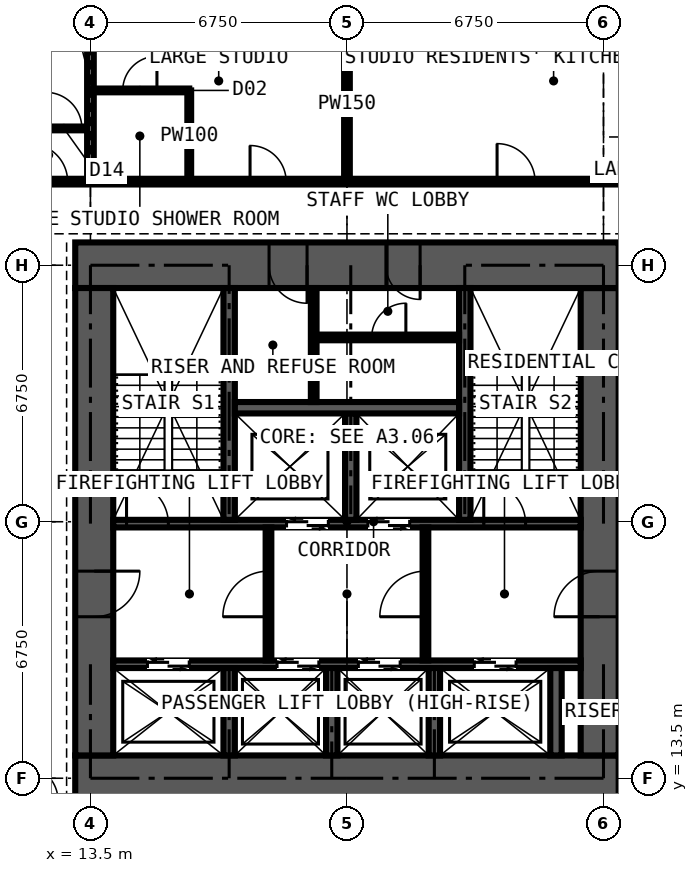
"""IFC4 building model, lengths in metres.
Left out: names, types, materials, properties, quantities, classifications, styles, units other than length and angle.
Written with IfcOpenShell. Run it as: python <this file> out.ifc"""

import sys

from ifc_helpers import new_model, si_unit, direction, frame, frame_2d, origin, place, context, subcontext, project, spatial, rectangle, extrude, element, fill, save


model = new_model("IFC4")
c1 = context("Model", 3, precision=1e-05, world=origin(), true_north=direction((0.0, 1.0)))
c2 = subcontext(c1, "Body", "Model", "MODEL_VIEW")
j1 = project(units=[si_unit("LENGTHUNIT", "METRE"), si_unit("PLANEANGLEUNIT", "RADIAN")], contexts=[c1])
p1 = place(None, origin())
s1 = spatial("IfcSite", under=j1, at=p1, CompositionType="ELEMENT")
p2 = place(p1, origin())
s2 = spatial("IfcBuilding", under=s1, at=p2, CompositionType="ELEMENT")
p3 = place(p2, frame((0.0, 0.0, 149.4)))
s3 = spatial("IfcBuildingStorey", under=s2, at=p3, CompositionType="ELEMENT", Elevation=149.4)
p4 = place(p3, frame((13.1, 13.5, 0.0), z_axis=(0.0, 0.0, 1.0), x_axis=(1.0, 0.0, 0.0)))
e1 = element("IfcWall", 1, at=p4, inside=s3, PredefinedType="SHEAR", context=c2, shape_type="SweptSolid", body=[
    extrude(rectangle(XDim=14.3, YDim=1.2, at=frame_2d((7.15, 0.0))), origin(), (0.0, 0.0, 1.0), 3.6),
])
p5 = place(p3, frame((26.9, 14.1, 0.0), z_axis=(0.0, 0.0, 1.0), x_axis=(0.0, 1.0, 0.0)))
e2 = element("IfcWall", 2, at=p5, inside=s3, PredefinedType="SHEAR", context=c2, shape_type="SweptSolid", body=[
    extrude(rectangle(XDim=12.3, YDim=1.0, at=frame_2d((6.15, 0.0))), origin(), (0.0, 0.0, 1.0), 3.6),
])
p6 = place(p5, frame((3.65, 0.0, 0.0)))
e3 = element("IfcOpeningElement", 3, at=p6, cuts=e2, PredefinedType="OPENING", context=c2, shape_type="SweptSolid", body=[
    extrude(rectangle(XDim=1.2, YDim=2.2, at=frame_2d((0.6, 1.1))), frame((0.0, 0.51, 0.0), z_axis=(0.0, -1.0, 0.0), x_axis=(1.0, 0.0, 0.0)), (0.0, 0.0, 1.0), 1.02),
])
p7 = place(p3, frame((27.4, 27.0, 0.0), z_axis=(0.0, 0.0, 1.0), x_axis=(-1.0, 0.0, 0.0)))
e4 = element("IfcWall", 4, at=p7, inside=s3, PredefinedType="SHEAR", context=c2, shape_type="SweptSolid", body=[
    extrude(rectangle(XDim=14.3, YDim=1.2, at=frame_2d((7.15, 0.0))), origin(), (0.0, 0.0, 1.0), 3.6),
])
p8 = place(p7, frame((5.225, 0.0, 0.0)))
e5 = element("IfcOpeningElement", 5, at=p8, cuts=e4, PredefinedType="OPENING", context=c2, shape_type="SweptSolid", body=[
    extrude(rectangle(XDim=0.9, YDim=2.2, at=frame_2d((0.45, 1.1))), frame((0.0, 0.61, 0.0), z_axis=(0.0, -1.0, 0.0), x_axis=(1.0, 0.0, 0.0)), (0.0, 0.0, 1.0), 1.22),
])
p9 = place(p7, frame((8.2, 0.0, 0.0)))
e6 = element("IfcOpeningElement", 6, at=p9, cuts=e4, PredefinedType="OPENING", context=c2, shape_type="SweptSolid", body=[
    extrude(rectangle(XDim=1.0, YDim=2.2, at=frame_2d((0.5, 1.1))), frame((0.0, 0.61, 0.0), z_axis=(0.0, -1.0, 0.0), x_axis=(1.0, 0.0, 0.0)), (0.0, 0.0, 1.0), 1.22),
])
p10 = place(p3, frame((13.6, 26.4, 0.0), z_axis=(0.0, 0.0, 1.0), x_axis=(0.0, -1.0, 0.0)))
e7 = element("IfcWall", 7, at=p10, inside=s3, PredefinedType="SHEAR", context=c2, shape_type="SweptSolid", body=[
    extrude(rectangle(XDim=12.3, YDim=1.0, at=frame_2d((6.15, 0.0))), origin(), (0.0, 0.0, 1.0), 3.6),
])
p11 = place(p10, frame((7.45, 0.0, 0.0)))
e8 = element("IfcOpeningElement", 8, at=p11, cuts=e7, PredefinedType="OPENING", context=c2, shape_type="SweptSolid", body=[
    extrude(rectangle(XDim=1.2, YDim=2.2, at=frame_2d((0.6, 1.1))), frame((0.0, 0.51, 0.0), z_axis=(0.0, -1.0, 0.0), x_axis=(1.0, 0.0, 0.0)), (0.0, 0.0, 1.0), 1.02),
])
p12 = place(p3, frame((14.1, 16.5, 0.0), z_axis=(0.0, 0.0, 1.0), x_axis=(1.0, 0.0, 0.0)))
e9 = element("IfcWall", 9, at=p12, inside=s3, PredefinedType="SHEAR", context=c2, shape_type="SweptSolid", body=[
    extrude(rectangle(XDim=12.3, YDim=0.2, at=frame_2d((6.15, 0.0))), origin(), (0.0, 0.0, 1.0), 3.6),
])
p13 = place(p12, frame((0.9, 0.0, 0.0)))
e10 = element("IfcOpeningElement", 10, at=p13, cuts=e9, PredefinedType="OPENING", context=c2, shape_type="SweptSolid", body=[
    extrude(rectangle(XDim=1.1, YDim=2.2, at=frame_2d((0.55, 1.1))), frame((0.0, 0.11, 0.0), z_axis=(0.0, -1.0, 0.0), x_axis=(1.0, 0.0, 0.0)), (0.0, 0.0, 1.0), 0.22),
])
p14 = place(p12, frame((4.31, 0.0, 0.0)))
e11 = element("IfcOpeningElement", 11, at=p14, cuts=e9, PredefinedType="OPENING", context=c2, shape_type="SweptSolid", body=[
    extrude(rectangle(XDim=1.1, YDim=2.2, at=frame_2d((0.55, 1.1))), frame((0.0, 0.11, 0.0), z_axis=(0.0, -1.0, 0.0), x_axis=(1.0, 0.0, 0.0)), (0.0, 0.0, 1.0), 0.22),
])
p15 = place(p12, frame((6.45, 0.0, 0.0)))
e12 = element("IfcOpeningElement", 12, at=p15, cuts=e9, PredefinedType="OPENING", context=c2, shape_type="SweptSolid", body=[
    extrude(rectangle(XDim=1.1, YDim=2.2, at=frame_2d((0.55, 1.1))), frame((0.0, 0.11, 0.0), z_axis=(0.0, -1.0, 0.0), x_axis=(1.0, 0.0, 0.0)), (0.0, 0.0, 1.0), 0.22),
])
p16 = place(p12, frame((9.5, 0.0, 0.0)))
e13 = element("IfcOpeningElement", 13, at=p16, cuts=e9, PredefinedType="OPENING", context=c2, shape_type="SweptSolid", body=[
    extrude(rectangle(XDim=1.1, YDim=2.2, at=frame_2d((0.55, 1.1))), frame((0.0, 0.11, 0.0), z_axis=(0.0, -1.0, 0.0), x_axis=(1.0, 0.0, 0.0)), (0.0, 0.0, 1.0), 0.22),
])
p17 = place(p3, frame((14.1, 20.2, 0.0), z_axis=(0.0, 0.0, 1.0), x_axis=(1.0, 0.0, 0.0)))
e14 = element("IfcWall", 14, at=p17, inside=s3, PredefinedType="SHEAR", context=c2, shape_type="SweptSolid", body=[
    extrude(rectangle(XDim=12.3, YDim=0.2, at=frame_2d((6.15, 0.0))), origin(), (0.0, 0.0, 1.0), 3.6),
])
p18 = place(p17, frame((4.56, 0.0, 0.0)))
e15 = element("IfcOpeningElement", 15, at=p18, cuts=e14, PredefinedType="OPENING", context=c2, shape_type="SweptSolid", body=[
    extrude(rectangle(XDim=1.1, YDim=2.2, at=frame_2d((0.55, 1.1))), frame((0.0, 0.11, 0.0), z_axis=(0.0, -1.0, 0.0), x_axis=(1.0, 0.0, 0.0)), (0.0, 0.0, 1.0), 0.22),
])
p19 = place(p17, frame((6.7, 0.0, 0.0)))
e16 = element("IfcOpeningElement", 16, at=p19, cuts=e14, PredefinedType="OPENING", context=c2, shape_type="SweptSolid", body=[
    extrude(rectangle(XDim=1.1, YDim=2.2, at=frame_2d((0.55, 1.1))), frame((0.0, 0.11, 0.0), z_axis=(0.0, -1.0, 0.0), x_axis=(1.0, 0.0, 0.0)), (0.0, 0.0, 1.0), 0.22),
])
p20 = place(p17, frame((0.35, 0.0, 0.0)))
e17 = element("IfcOpeningElement", 17, at=p20, cuts=e14, PredefinedType="OPENING", context=c2, shape_type="SweptSolid", body=[
    extrude(rectangle(XDim=1.1, YDim=2.2, at=frame_2d((0.55, 1.1))), frame((0.0, 0.11, 0.0), z_axis=(0.0, -1.0, 0.0), x_axis=(1.0, 0.0, 0.0)), (0.0, 0.0, 1.0), 0.22),
])
p21 = place(p17, frame((9.75, 0.0, 0.0)))
e18 = element("IfcOpeningElement", 18, at=p21, cuts=e14, PredefinedType="OPENING", context=c2, shape_type="SweptSolid", body=[
    extrude(rectangle(XDim=1.1, YDim=2.2, at=frame_2d((0.55, 1.1))), frame((0.0, 0.11, 0.0), z_axis=(0.0, -1.0, 0.0), x_axis=(1.0, 0.0, 0.0)), (0.0, 0.0, 1.0), 0.22),
])
for number, where, z_axis, x_axis in (
    (19, (17.15, 20.3, 0.0), (0.0, 0.0, 1.0), (0.0, 1.0, 0.0)),
    (20, (23.35, 20.3, 0.0), (0.0, 0.0, 1.0), (0.0, 1.0, 0.0)),
):
    element("IfcWall", number, at=place(p3, frame(where, z_axis=z_axis, x_axis=x_axis)), inside=s3, PredefinedType="SHEAR", context=c2, shape_type="SweptSolid", body=[
        extrude(rectangle(XDim=6.1, YDim=0.3, at=frame_2d((3.05, 0.0))), origin(), (0.0, 0.0, 1.0), 3.6),
    ])
p22 = place(p3, frame((20.35, 20.3, 0.0), z_axis=(0.0, 0.0, 1.0), x_axis=(0.0, 1.0, 0.0)))
e21 = element("IfcWall", 21, at=p22, inside=s3, PredefinedType="SHEAR", context=c2, shape_type="SweptSolid", body=[
    extrude(rectangle(XDim=2.8, YDim=0.3, at=frame_2d((1.4, 0.0))), origin(), (0.0, 0.0, 1.0), 3.6),
])
p23 = place(p3, frame((17.3, 23.25, 0.0), z_axis=(0.0, 0.0, 1.0), x_axis=(1.0, 0.0, 0.0)))
e22 = element("IfcWall", 22, at=p23, inside=s3, PredefinedType="SHEAR", context=c2, shape_type="SweptSolid", body=[
    extrude(rectangle(XDim=5.9, YDim=0.3, at=frame_2d((2.95, 0.0))), origin(), (0.0, 0.0, 1.0), 3.6),
])
for number, where, z_axis, x_axis in (
    (23, (17.15, 14.1, 0.0), (0.0, 0.0, 1.0), (0.0, 1.0, 0.0)),
    (24, (19.85, 14.1, 0.0), (0.0, 0.0, 1.0), (0.0, 1.0, 0.0)),
    (25, (22.55, 14.1, 0.0), (0.0, 0.0, 1.0), (0.0, 1.0, 0.0)),
    (26, (25.75, 14.1, 0.0), (0.0, 0.0, 1.0), (0.0, 1.0, 0.0)),
):
    element("IfcWall", number, at=place(p3, frame(where, z_axis=z_axis, x_axis=x_axis)), inside=s3, PredefinedType="SHEAR", context=c2, shape_type="SweptSolid", body=[
        extrude(rectangle(XDim=2.3, YDim=0.3, at=frame_2d((1.15, 0.0))), origin(), (0.0, 0.0, 1.0), 3.6),
    ])
p24 = place(p3, frame((18.185, 16.6, 0.0), z_axis=(0.0, 0.0, 1.0), x_axis=(0.0, 1.0, 0.0)))
e27 = element("IfcWall", 27, at=p24, inside=s3, PredefinedType="PARTITIONING", context=c2, shape_type="SweptSolid", body=[
    extrude(rectangle(XDim=3.5, YDim=0.15, at=frame_2d((1.75, 0.0))), origin(), (0.0, 0.0, 1.0), 3.375),
])
p25 = place(p24, frame((1.15, 0.0, 0.0)))
e28 = element("IfcOpeningElement", 28, at=p25, cuts=e27, PredefinedType="OPENING", context=c2, shape_type="SweptSolid", body=[
    extrude(rectangle(XDim=1.2, YDim=2.2, at=frame_2d((0.6, 1.1))), frame((0.0, 0.085, 0.0), z_axis=(0.0, -1.0, 0.0), x_axis=(1.0, 0.0, 0.0)), (0.0, 0.0, 1.0), 0.17),
])
p26 = place(p3, frame((22.315, 16.6, 0.0), z_axis=(0.0, 0.0, 1.0), x_axis=(0.0, 1.0, 0.0)))
e29 = element("IfcWall", 29, at=p26, inside=s3, PredefinedType="PARTITIONING", context=c2, shape_type="SweptSolid", body=[
    extrude(rectangle(XDim=3.5, YDim=0.15, at=frame_2d((1.75, 0.0))), origin(), (0.0, 0.0, 1.0), 3.375),
])
p27 = place(p26, frame((1.15, 0.0, 0.0)))
e30 = element("IfcOpeningElement", 30, at=p27, cuts=e29, PredefinedType="OPENING", context=c2, shape_type="SweptSolid", body=[
    extrude(rectangle(XDim=1.2, YDim=2.2, at=frame_2d((0.6, 1.1))), frame((0.0, 0.085, 0.0), z_axis=(0.0, -1.0, 0.0), x_axis=(1.0, 0.0, 0.0)), (0.0, 0.0, 1.0), 0.17),
])
p28 = place(p3, frame((19.375, 23.4, 0.0), z_axis=(0.0, 0.0, 1.0), x_axis=(0.0, 1.0, 0.0)))
e31 = element("IfcWall", 31, at=p28, inside=s3, PredefinedType="PARTITIONING", context=c2, shape_type="SweptSolid", body=[
    extrude(rectangle(XDim=3.0, YDim=0.15, at=frame_2d((1.5, 0.0))), origin(), (0.0, 0.0, 1.0), 3.375),
])
p29 = place(p3, frame((19.45, 25.1, 0.0), z_axis=(0.0, 0.0, 1.0), x_axis=(1.0, 0.0, 0.0)))
e32 = element("IfcWall", 32, at=p29, inside=s3, PredefinedType="PARTITIONING", context=c2, shape_type="SweptSolid", body=[
    extrude(rectangle(XDim=3.75, YDim=0.15, at=frame_2d((1.875, 0.0))), origin(), (0.0, 0.0, 1.0), 3.375),
])
p30 = place(p29, frame((1.45, 0.0, 0.0)))
e33 = element("IfcOpeningElement", 33, at=p30, cuts=e32, PredefinedType="OPENING", context=c2, shape_type="SweptSolid", body=[
    extrude(rectangle(XDim=0.9, YDim=2.2, at=frame_2d((0.45, 1.1))), frame((0.0, 0.085, 0.0), z_axis=(0.0, -1.0, 0.0), x_axis=(1.0, 0.0, 0.0)), (0.0, 0.0, 1.0), 0.17),
])
p31 = place(p3, frame((10.125, 30.6, 0.0), z_axis=(0.0, 0.0, 1.0), x_axis=(1.0, 0.0, 0.0)))
e34 = element("IfcWall", 34, at=p31, inside=s3, PredefinedType="PARTITIONING", context=c2, shape_type="SweptSolid", body=[
    extrude(rectangle(XDim=3.375, YDim=0.1, at=frame_2d((1.688, 0.0))), origin(), (0.0, 0.0, 1.0), 3.375),
])
p32 = place(p31, frame((2.2, 0.0, 0.0)))
e35 = element("IfcOpeningElement", 35, at=p32, cuts=e34, PredefinedType="OPENING", context=c2, shape_type="SweptSolid", body=[
    extrude(rectangle(XDim=0.95, YDim=2.2, at=frame_2d((0.475, 1.1))), frame((0.0, 0.06, 0.0), z_axis=(0.0, -1.0, 0.0), x_axis=(1.0, 0.0, 0.0)), (0.0, 0.0, 1.0), 0.12),
])
p33 = place(p3, frame((11.3, 29.2, 0.0), z_axis=(0.0, 0.0, 1.0), x_axis=(1.0, 0.0, 0.0)))
e36 = element("IfcWall", 36, at=p33, inside=s3, PredefinedType="PARTITIONING", context=c2, shape_type="SweptSolid", body=[
    extrude(rectangle(XDim=19.809, YDim=0.15, at=frame_2d((9.904, 0.0))), origin(), (0.0, 0.0, 1.0), 3.375),
])
p34 = place(p33, frame((12.9, 0.0, 0.0)))
e37 = element("IfcOpeningElement", 37, at=p34, cuts=e36, PredefinedType="OPENING", context=c2, shape_type="SweptSolid", body=[
    extrude(rectangle(XDim=1.0, YDim=2.2, at=frame_2d((0.5, 1.1))), frame((0.0, 0.085, 0.0), z_axis=(0.0, -1.0, 0.0), x_axis=(1.0, 0.0, 0.0)), (0.0, 0.0, 1.0), 0.17),
])
p35 = place(p33, frame((6.4, 0.0, 0.0)))
e38 = element("IfcOpeningElement", 38, at=p35, cuts=e36, PredefinedType="OPENING", context=c2, shape_type="SweptSolid", body=[
    extrude(rectangle(XDim=0.95, YDim=2.2, at=frame_2d((0.475, 1.1))), frame((0.0, 0.085, 0.0), z_axis=(0.0, -1.0, 0.0), x_axis=(1.0, 0.0, 0.0)), (0.0, 0.0, 1.0), 0.17),
])
p36 = place(p33, frame((0.6, 0.0, 0.0)))
e39 = element("IfcOpeningElement", 39, at=p36, cuts=e36, PredefinedType="OPENING", context=c2, shape_type="SweptSolid", body=[
    extrude(rectangle(XDim=1.0, YDim=2.2, at=frame_2d((0.5, 1.1))), frame((0.0, 0.085, 0.0), z_axis=(0.0, -1.0, 0.0), x_axis=(1.0, 0.0, 0.0)), (0.0, 0.0, 1.0), 0.17),
])
p37 = place(p3, frame((13.5, 29.2, 0.0), z_axis=(0.0, 0.0, 1.0), x_axis=(0.0, 1.0, 0.0)))
e40 = element("IfcWall", 40, at=p37, inside=s3, PredefinedType="PARTITIONING", context=c2, shape_type="SweptSolid", body=[
    extrude(rectangle(XDim=5.284, YDim=0.175, at=frame_2d((2.642, 0.0))), origin(), (0.0, 0.0, 1.0), 2.806),
])
p38 = place(p3, frame((13.5, 31.6, 0.0), z_axis=(0.0, 0.0, 1.0), x_axis=(1.0, 0.0, 0.0)))
e41 = element("IfcWall", 41, at=p38, inside=s3, PredefinedType="PARTITIONING", context=c2, shape_type="SweptSolid", body=[
    extrude(rectangle(XDim=2.6, YDim=0.1, at=frame_2d((1.3, 0.0))), origin(), (0.0, 0.0, 1.0), 3.375),
])
p39 = place(p38, frame((0.85, 0.0, 0.0)))
e42 = element("IfcOpeningElement", 42, at=p39, cuts=e41, PredefinedType="OPENING", context=c2, shape_type="SweptSolid", body=[
    extrude(rectangle(XDim=0.9, YDim=2.2, at=frame_2d((0.45, 1.1))), frame((0.0, 0.06, 0.0), z_axis=(0.0, -1.0, 0.0), x_axis=(1.0, 0.0, 0.0)), (0.0, 0.0, 1.0), 0.12),
])
p40 = place(p3, frame((16.1, 29.2, 0.0), z_axis=(0.0, 0.0, 1.0), x_axis=(0.0, 1.0, 0.0)))
e43 = element("IfcWall", 43, at=p40, inside=s3, PredefinedType="PARTITIONING", context=c2, shape_type="SweptSolid", body=[
    extrude(rectangle(XDim=2.4, YDim=0.1, at=frame_2d((1.2, 0.0))), origin(), (0.0, 0.0, 1.0), 3.375),
])
p41 = place(p3, frame((20.25, 29.2, 0.0), z_axis=(0.0, 0.0, 1.0), x_axis=(0.0, 1.0, 0.0)))
e44 = element("IfcWall", 44, at=p41, inside=s3, PredefinedType="PARTITIONING", context=c2, shape_type="SweptSolid", body=[
    extrude(rectangle(XDim=5.284, YDim=0.15, at=frame_2d((2.642, 0.0))), origin(), (0.0, 0.0, 1.0), 2.806),
])
p42 = place(p13, origin())
e45 = element("IfcDoor", 45, at=p42, inside=s3, OperationType="DOUBLE_DOOR_SLIDING", PredefinedType="DOOR", context=c2, shape_type="SweptSolid", body=[
    extrude(rectangle(XDim=1.1, YDim=2.2, at=frame_2d((0.55, 1.1))), frame((0.0, 0.025, 0.0), z_axis=(0.0, -1.0, 0.0), x_axis=(1.0, 0.0, 0.0)), (0.0, 0.0, 1.0), 0.05),
])
fill(e10, e45)
p43 = place(p14, origin())
e46 = element("IfcDoor", 46, at=p43, inside=s3, OperationType="DOUBLE_DOOR_SLIDING", PredefinedType="DOOR", context=c2, shape_type="SweptSolid", body=[
    extrude(rectangle(XDim=1.1, YDim=2.2, at=frame_2d((0.55, 1.1))), frame((0.0, 0.025, 0.0), z_axis=(0.0, -1.0, 0.0), x_axis=(1.0, 0.0, 0.0)), (0.0, 0.0, 1.0), 0.05),
])
fill(e11, e46)
p44 = place(p15, origin())
e47 = element("IfcDoor", 47, at=p44, inside=s3, OperationType="DOUBLE_DOOR_SLIDING", PredefinedType="DOOR", context=c2, shape_type="SweptSolid", body=[
    extrude(rectangle(XDim=1.1, YDim=2.2, at=frame_2d((0.55, 1.1))), frame((0.0, 0.025, 0.0), z_axis=(0.0, -1.0, 0.0), x_axis=(1.0, 0.0, 0.0)), (0.0, 0.0, 1.0), 0.05),
])
fill(e12, e47)
p45 = place(p16, origin())
e48 = element("IfcDoor", 48, at=p45, inside=s3, OperationType="DOUBLE_DOOR_SLIDING", PredefinedType="DOOR", context=c2, shape_type="SweptSolid", body=[
    extrude(rectangle(XDim=1.1, YDim=2.2, at=frame_2d((0.55, 1.1))), frame((0.0, 0.025, 0.0), z_axis=(0.0, -1.0, 0.0), x_axis=(1.0, 0.0, 0.0)), (0.0, 0.0, 1.0), 0.05),
])
fill(e13, e48)
p46 = place(p18, origin())
e49 = element("IfcDoor", 49, at=p46, inside=s3, OperationType="DOUBLE_DOOR_SLIDING", PredefinedType="DOOR", context=c2, shape_type="SweptSolid", body=[
    extrude(rectangle(XDim=1.1, YDim=2.2, at=frame_2d((0.55, 1.1))), frame((0.0, 0.025, 0.0), z_axis=(0.0, -1.0, 0.0), x_axis=(1.0, 0.0, 0.0)), (0.0, 0.0, 1.0), 0.05),
])
fill(e15, e49)
p47 = place(p19, origin())
e50 = element("IfcDoor", 50, at=p47, inside=s3, OperationType="DOUBLE_DOOR_SLIDING", PredefinedType="DOOR", context=c2, shape_type="SweptSolid", body=[
    extrude(rectangle(XDim=1.1, YDim=2.2, at=frame_2d((0.55, 1.1))), frame((0.0, 0.025, 0.0), z_axis=(0.0, -1.0, 0.0), x_axis=(1.0, 0.0, 0.0)), (0.0, 0.0, 1.0), 0.05),
])
fill(e16, e50)
p48 = place(p11, origin())
e51 = element("IfcDoor", 51, at=p48, inside=s3, OperationType="DOUBLE_DOOR_SINGLE_SWING", PredefinedType="DOOR", context=c2, shape_type="SweptSolid", body=[
    extrude(rectangle(XDim=1.2, YDim=2.2, at=frame_2d((0.6, 1.1))), frame((0.0, 0.025, 0.0), z_axis=(0.0, -1.0, 0.0), x_axis=(1.0, 0.0, 0.0)), (0.0, 0.0, 1.0), 0.05),
])
fill(e8, e51)
p49 = place(p6, origin())
e52 = element("IfcDoor", 52, at=p49, inside=s3, OperationType="DOUBLE_DOOR_SINGLE_SWING", PredefinedType="DOOR", context=c2, shape_type="SweptSolid", body=[
    extrude(rectangle(XDim=1.2, YDim=2.2, at=frame_2d((0.6, 1.1))), frame((0.0, 0.025, 0.0), z_axis=(0.0, -1.0, 0.0), x_axis=(1.0, 0.0, 0.0)), (0.0, 0.0, 1.0), 0.05),
])
fill(e3, e52)
p50 = place(p25, origin())
e53 = element("IfcDoor", 53, at=p50, inside=s3, OperationType="DOUBLE_DOOR_SINGLE_SWING", PredefinedType="DOOR", context=c2, shape_type="SweptSolid", body=[
    extrude(rectangle(XDim=1.2, YDim=2.2, at=frame_2d((0.6, 1.1))), frame((0.0, 0.025, 0.0), z_axis=(0.0, -1.0, 0.0), x_axis=(1.0, 0.0, 0.0)), (0.0, 0.0, 1.0), 0.05),
])
fill(e28, e53)
p51 = place(p27, origin())
e54 = element("IfcDoor", 54, at=p51, inside=s3, OperationType="DOUBLE_DOOR_SINGLE_SWING", PredefinedType="DOOR", context=c2, shape_type="SweptSolid", body=[
    extrude(rectangle(XDim=1.2, YDim=2.2, at=frame_2d((0.6, 1.1))), frame((0.0, 0.025, 0.0), z_axis=(0.0, -1.0, 0.0), x_axis=(1.0, 0.0, 0.0)), (0.0, 0.0, 1.0), 0.05),
])
fill(e30, e54)
p52 = place(p30, origin())
e55 = element("IfcDoor", 55, at=p52, inside=s3, OperationType="SINGLE_SWING_RIGHT", PredefinedType="DOOR", context=c2, shape_type="SweptSolid", body=[
    extrude(rectangle(XDim=0.9, YDim=2.2, at=frame_2d((0.45, 1.1))), frame((0.0, 0.025, 0.0), z_axis=(0.0, -1.0, 0.0), x_axis=(1.0, 0.0, 0.0)), (0.0, 0.0, 1.0), 0.05),
])
fill(e33, e55)
p53 = place(p8, origin())
e56 = element("IfcDoor", 56, at=p53, inside=s3, OperationType="SINGLE_SWING_LEFT", PredefinedType="DOOR", context=c2, shape_type="SweptSolid", body=[
    extrude(rectangle(XDim=0.9, YDim=2.2, at=frame_2d((0.45, 1.1))), frame((0.0, 0.4, 0.0), z_axis=(0.0, -1.0, 0.0), x_axis=(1.0, 0.0, 0.0)), (0.0, 0.0, 1.0), 0.8),
])
fill(e5, e56)
p54 = place(p9, origin())
e57 = element("IfcDoor", 57, at=p54, inside=s3, OperationType="SINGLE_SWING_LEFT", PredefinedType="DOOR", context=c2, shape_type="SweptSolid", body=[
    extrude(rectangle(XDim=1.0, YDim=2.2, at=frame_2d((0.5, 1.1))), frame((0.0, 0.025, 0.0), z_axis=(0.0, -1.0, 0.0), x_axis=(1.0, 0.0, 0.0)), (0.0, 0.0, 1.0), 0.05),
])
fill(e6, e57)
p55 = place(p20, origin())
e58 = element("IfcDoor", 58, at=p55, inside=s3, OperationType="SINGLE_SWING_LEFT", PredefinedType="DOOR", context=c2, shape_type="SweptSolid", body=[
    extrude(rectangle(XDim=1.1, YDim=2.2, at=frame_2d((0.55, 1.1))), frame((0.0, 0.025, 0.0), z_axis=(0.0, -1.0, 0.0), x_axis=(1.0, 0.0, 0.0)), (0.0, 0.0, 1.0), 0.05),
])
fill(e17, e58)
p56 = place(p21, origin())
e59 = element("IfcDoor", 59, at=p56, inside=s3, OperationType="SINGLE_SWING_LEFT", PredefinedType="DOOR", context=c2, shape_type="SweptSolid", body=[
    extrude(rectangle(XDim=1.1, YDim=2.2, at=frame_2d((0.55, 1.1))), frame((0.0, 0.025, 0.0), z_axis=(0.0, -1.0, 0.0), x_axis=(1.0, 0.0, 0.0)), (0.0, 0.0, 1.0), 0.05),
])
fill(e18, e59)
p57 = place(p34, origin())
e60 = element("IfcDoor", 60, at=p57, inside=s3, OperationType="SINGLE_SWING_LEFT", PredefinedType="DOOR", context=c2, shape_type="SweptSolid", body=[
    extrude(rectangle(XDim=1.0, YDim=2.2, at=frame_2d((0.5, 1.1))), frame((0.0, 0.025, 0.0), z_axis=(0.0, -1.0, 0.0), x_axis=(1.0, 0.0, 0.0)), (0.0, 0.0, 1.0), 0.05),
])
fill(e37, e60)
p58 = place(p35, origin())
e61 = element("IfcDoor", 61, at=p58, inside=s3, OperationType="SINGLE_SWING_LEFT", PredefinedType="DOOR", context=c2, shape_type="SweptSolid", body=[
    extrude(rectangle(XDim=0.95, YDim=2.2, at=frame_2d((0.475, 1.1))), frame((0.0, 0.025, 0.0), z_axis=(0.0, -1.0, 0.0), x_axis=(1.0, 0.0, 0.0)), (0.0, 0.0, 1.0), 0.05),
])
fill(e38, e61)
p59 = place(p39, origin())
e62 = element("IfcDoor", 62, at=p59, inside=s3, OperationType="SINGLE_SWING_RIGHT", PredefinedType="DOOR", context=c2, shape_type="SweptSolid", body=[
    extrude(rectangle(XDim=0.9, YDim=2.2, at=frame_2d((0.45, 1.1))), frame((0.0, 0.025, 0.0), z_axis=(0.0, -1.0, 0.0), x_axis=(1.0, 0.0, 0.0)), (0.0, 0.0, 1.0), 0.05),
])
fill(e42, e62)
p60 = place(p32, origin())
e63 = element("IfcDoor", 63, at=p60, inside=s3, OperationType="SINGLE_SWING_LEFT", PredefinedType="DOOR", context=c2, shape_type="SweptSolid", body=[
    extrude(rectangle(XDim=0.95, YDim=2.2, at=frame_2d((0.475, 1.1))), frame((0.0, 0.025, 0.0), z_axis=(0.0, -1.0, 0.0), x_axis=(1.0, 0.0, 0.0)), (0.0, 0.0, 1.0), 0.05),
])
fill(e35, e63)
p61 = place(p36, origin())
e64 = element("IfcDoor", 64, at=p61, inside=s3, OperationType="SINGLE_SWING_LEFT", PredefinedType="DOOR", context=c2, shape_type="SweptSolid", body=[
    extrude(rectangle(XDim=1.0, YDim=2.2, at=frame_2d((0.5, 1.1))), frame((0.0, 0.025, 0.0), z_axis=(0.0, -1.0, 0.0), x_axis=(1.0, 0.0, 0.0)), (0.0, 0.0, 1.0), 0.05),
])
fill(e39, e64)
save(model, sys.argv[1])
